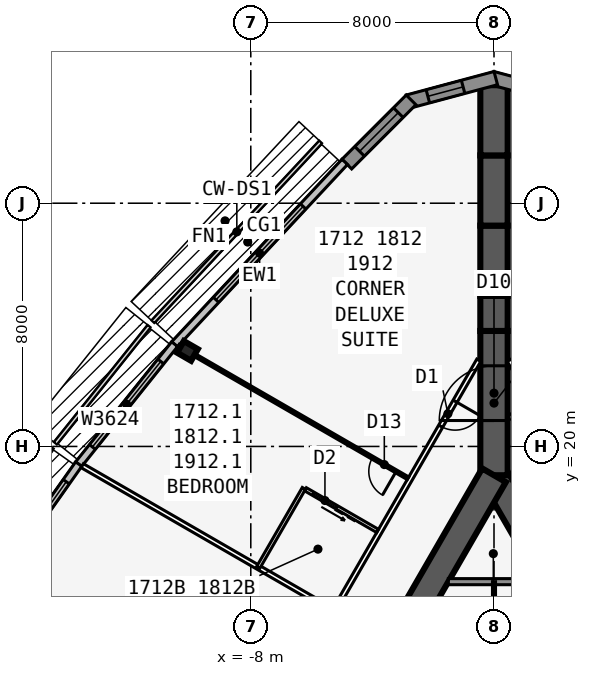
"""IFC4 building model, lengths in metres.
Left out: names, types, materials, properties, quantities, classifications, styles, units other than length and angle.
Written with IfcOpenShell. Run it as: python <this file> out.ifc"""

import sys

from ifc_helpers import new_model, si_unit, direction, frame, frame_2d, origin, origin_2d, place, context, subcontext, project, spatial, polyline, rectangle, i_section, outline, extrude, element, fill, save


model = new_model("IFC4")
c1 = context("Model", 3, precision=1e-05, world=origin(), true_north=direction((0.0, 1.0)))
c2 = subcontext(c1, "Body", "Model", "MODEL_VIEW")
j1 = project(units=[si_unit("LENGTHUNIT", "METRE"), si_unit("PLANEANGLEUNIT", "RADIAN")], contexts=[c1])
p1 = place(None, origin())
s1 = spatial("IfcSite", under=j1, at=p1, CompositionType="ELEMENT")
p2 = place(p1, origin())
s2 = spatial("IfcBuilding", under=s1, at=p2, CompositionType="ELEMENT")
p3 = place(p2, frame((0.0, 0.0, 69.3)))
s3 = spatial("IfcBuildingStorey", under=s2, at=p3, CompositionType="ELEMENT", Elevation=69.3)
p4 = place(p3, frame((16.5, -9.526, 0.0), z_axis=(0.0, 0.0, 1.0), x_axis=(-0.499999749417, 0.866025548458, 0.0)))
e1 = element("IfcWall", 1, at=p4, inside=s3, PredefinedType="SHEAR", context=c2, shape_type="SweptSolid", body=[
    extrude(rectangle(XDim=33.0, YDim=0.9, at=frame_2d((16.5, 0.0))), origin(), (0.0, 0.0, 1.0), 3.4),
])
p5 = place(p4, frame((14.15, 0.0, 0.0)))
e2 = element("IfcOpeningElement", 2, at=p5, cuts=e1, PredefinedType="OPENING", context=c2, shape_type="SweptSolid", body=[
    extrude(rectangle(XDim=1.8, YDim=2.13, at=frame_2d((0.9, 1.065))), frame((0.0, 0.46, 0.0), z_axis=(0.0, -1.0, 0.0), x_axis=(1.0, 0.0, 0.0)), (0.0, 0.0, 1.0), 0.92),
])
p6 = place(p4, frame((12.6, 0.0, 0.0)))
e3 = element("IfcOpeningElement", 3, at=p6, cuts=e1, PredefinedType="OPENING", context=c2, shape_type="SweptSolid", body=[
    extrude(rectangle(XDim=1.0, YDim=2.13, at=frame_2d((0.5, 1.065))), frame((0.0, 0.46, 0.0), z_axis=(0.0, -1.0, 0.0), x_axis=(1.0, 0.0, 0.0)), (0.0, 0.0, 1.0), 0.92),
])
p7 = place(p3, frame((0.0, 19.052, 0.0), z_axis=(0.0, 0.0, 1.0), x_axis=(-0.499999749417, -0.866025548458, 0.0)))
e4 = element("IfcWall", 4, at=p7, inside=s3, PredefinedType="SHEAR", context=c2, shape_type="SweptSolid", body=[
    extrude(rectangle(XDim=33.0, YDim=0.9, at=frame_2d((16.5, 0.0))), origin(), (0.0, 0.0, 1.0), 3.4),
])
p8 = place(p7, frame((14.15, 0.0, 0.0)))
e5 = element("IfcOpeningElement", 5, at=p8, cuts=e4, PredefinedType="OPENING", context=c2, shape_type="SweptSolid", body=[
    extrude(rectangle(XDim=1.8, YDim=2.13, at=frame_2d((0.9, 1.065))), frame((0.0, 0.46, 0.0), z_axis=(0.0, -1.0, 0.0), x_axis=(1.0, 0.0, 0.0)), (0.0, 0.0, 1.0), 0.92),
])
p9 = place(p7, frame((12.6, 0.0, 0.0)))
e6 = element("IfcOpeningElement", 6, at=p9, cuts=e4, PredefinedType="OPENING", context=c2, shape_type="SweptSolid", body=[
    extrude(rectangle(XDim=1.0, YDim=2.13, at=frame_2d((0.5, 1.065))), frame((0.0, 0.46, 0.0), z_axis=(0.0, -1.0, 0.0), x_axis=(1.0, 0.0, 0.0)), (0.0, 0.0, 1.0), 0.92),
])
p10 = place(p3, frame((0.0, 19.052, 0.0), z_axis=(0.0, 0.0, 1.0), x_axis=(0.0, 1.0, 0.0)))
e7 = element("IfcWall", 7, at=p10, inside=s3, PredefinedType="SHEAR", context=c2, shape_type="SweptSolid", body=[
    extrude(rectangle(XDim=4.746, YDim=0.9, at=frame_2d((2.373, 0.0))), origin(), (0.0, 0.0, 1.0), 3.4),
])
p11 = place(p10, frame((1.8, 0.0, 0.0)))
e8 = element("IfcOpeningElement", 8, at=p11, cuts=e7, PredefinedType="OPENING", context=c2, shape_type="SweptSolid", body=[
    extrude(rectangle(XDim=1.8, YDim=2.13, at=frame_2d((0.9, 1.065))), frame((0.0, 0.46, 0.0), z_axis=(0.0, -1.0, 0.0), x_axis=(1.0, 0.0, 0.0)), (0.0, 0.0, 1.0), 0.92),
])
p12 = place(p3, frame((0.0, 23.799, 0.0), z_axis=(0.0, 0.0, 1.0), x_axis=(0.0, 1.0, 0.0)))
e9 = element("IfcWall", 9, at=p12, inside=s3, PredefinedType="SHEAR", context=c2, shape_type="SweptSolid", body=[
    extrude(rectangle(XDim=1.155, YDim=0.9, at=frame_2d((0.577, 0.0))), origin(), (0.0, 0.0, 1.0), 3.4),
])
p13 = place(p3, frame((0.0, 24.953, 0.0), z_axis=(0.0, 0.0, 1.0), x_axis=(0.0, 1.0, 0.0)))
e10 = element("IfcWall", 10, at=p13, inside=s3, PredefinedType="SHEAR", context=c2, shape_type="SweptSolid", body=[
    extrude(rectangle(XDim=2.309, YDim=0.9, at=frame_2d((1.155, 0.0))), origin(), (0.0, 0.0, 1.0), 3.4),
])
p14 = place(p3, frame((0.0, 27.263, 0.0), z_axis=(0.0, 0.0, 1.0), x_axis=(0.0, 1.0, 0.0)))
e11 = element("IfcWall", 11, at=p14, inside=s3, PredefinedType="SHEAR", context=c2, shape_type="SweptSolid", body=[
    extrude(rectangle(XDim=2.31, YDim=0.9, at=frame_2d((1.155, 0.0))), origin(), (0.0, 0.0, 1.0), 3.4),
])
p15 = place(p3, frame((0.0, 29.572, 0.0), z_axis=(0.0, 0.0, 1.0), x_axis=(0.0, 1.0, 0.0)))
e12 = element("IfcWall", 12, at=p15, inside=s3, PredefinedType="SHEAR", context=c2, shape_type="SweptSolid", body=[
    extrude(rectangle(XDim=2.309, YDim=0.9, at=frame_2d((1.155, 0.0))), origin(), (0.0, 0.0, 1.0), 3.4),
])
p16 = place(p3, frame((-10.083, 23.142, 0.0), z_axis=(0.0, 0.0, 1.0), x_axis=(-0.5, -0.866025403784, 0.0)))
e13 = element("IfcColumn", 13, at=p16, inside=s3, PredefinedType="COLUMN", context=c2, shape_type="SweptSolid", body=[
    extrude(i_section(OverallWidth=0.442, OverallDepth=0.531, WebThickness=0.066, FlangeThickness=0.106, at=origin_2d()), origin(), (0.0, 0.0, 1.0), 3.4),
])
p17 = place(p3, frame((2.829, 31.341, 0.0), z_axis=(0.0, 0.0, 1.0), x_axis=(-0.965930548995, 0.258801419081, 0.0)))
e14 = element("IfcWall", 14, at=p17, inside=s3, PredefinedType="SOLIDWALL", context=c2, shape_type="SweptSolid", body=[
    extrude(outline(polyline([(2.989, 0.225), (2.929, 0.225), (2.438, 0.093), (2.402, 0.225), (0.0, 0.225), (0.0, -0.225), (2.989, -0.225), (2.989, 0.225)])), origin(), (0.0, 0.0, 1.0), 3.235),
])
p18 = place(p17, frame((0.676, 0.0, 0.45)))
e15 = element("IfcOpeningElement", 15, at=p18, cuts=e14, PredefinedType="OPENING", context=c2, shape_type="SweptSolid", body=[
    extrude(rectangle(XDim=1.2, YDim=2.4, at=frame_2d((0.6, 1.2))), frame((0.0, 0.235, 0.0), z_axis=(0.0, -1.0, 0.0), x_axis=(1.0, 0.0, 0.0)), (0.0, 0.0, 1.0), 0.47),
])
p19 = place(p3, frame((0.058, 32.114, 0.0), z_axis=(0.0, 0.0, 1.0), x_axis=(-0.965930548995, -0.258801419081, 0.0)))
e16 = element("IfcWall", 16, at=p19, inside=s3, PredefinedType="SOLIDWALL", context=c2, shape_type="SweptSolid", body=[
    extrude(outline(polyline([(2.989, 0.225), (0.586, 0.225), (0.551, 0.093), (0.059, 0.225), (0.0, 0.225), (0.0, -0.225), (2.989, -0.225), (2.989, 0.225)])), origin(), (0.0, 0.0, 1.0), 3.235),
])
p20 = place(p19, frame((1.113, 0.0, 0.45)))
e17 = element("IfcOpeningElement", 17, at=p20, cuts=e16, PredefinedType="OPENING", context=c2, shape_type="SweptSolid", body=[
    extrude(rectangle(XDim=1.2, YDim=2.4, at=frame_2d((0.6, 1.2))), frame((0.0, 0.235, 0.0), z_axis=(0.0, -1.0, 0.0), x_axis=(1.0, 0.0, 0.0)), (0.0, 0.0, 1.0), 0.47),
])
p21 = place(p3, frame((-2.728, 31.399, 0.0), z_axis=(0.0, 0.0, 1.0), x_axis=(-0.707106781187, -0.707106781187, 0.0)))
e18 = element("IfcWall", 18, at=p21, inside=s3, PredefinedType="SOLIDWALL", context=c2, shape_type="SweptSolid", body=[
    extrude(rectangle(XDim=2.988, YDim=0.45, at=frame_2d((1.494, 0.0))), origin(), (0.0, 0.0, 1.0), 3.235),
])
p22 = place(p21, frame((0.594, 0.0, 0.45)))
e19 = element("IfcOpeningElement", 19, at=p22, cuts=e18, PredefinedType="OPENING", context=c2, shape_type="SweptSolid", body=[
    extrude(rectangle(XDim=1.8, YDim=2.4, at=frame_2d((0.9, 1.2))), frame((0.0, 0.235, 0.0), z_axis=(0.0, -1.0, 0.0), x_axis=(1.0, 0.0, 0.0)), (0.0, 0.0, 1.0), 0.47),
])
p23 = place(p3, frame((-4.909, 29.36, 0.0), z_axis=(0.0, 0.0, 1.0), x_axis=(-0.682289646561, -0.731081964075, 0.0)))
e20 = element("IfcWall", 20, at=p23, inside=s3, PredefinedType="STANDARD", context=c2, shape_type="SweptSolid", body=[
    extrude(rectangle(XDim=8.211, YDim=0.25, at=frame_2d((4.105, 0.0))), origin(), (0.0, 0.0, 1.0), 3.235),
])
p24 = place(p23, frame((2.006, 0.0, 0.45)))
e21 = element("IfcOpeningElement", 21, at=p24, cuts=e20, PredefinedType="OPENING", context=c2, shape_type="SweptSolid", body=[
    extrude(rectangle(XDim=4.2, YDim=2.4, at=frame_2d((2.1, 1.2))), frame((0.0, 0.135, 0.0), z_axis=(0.0, -1.0, 0.0), x_axis=(1.0, 0.0, 0.0)), (0.0, 0.0, 1.0), 0.27),
])
p25 = place(p3, frame((-10.505, 23.364, 0.0), z_axis=(0.0, 0.0, 1.0), x_axis=(-0.624594965756, -0.780948864364, 0.0)))
e22 = element("IfcWall", 22, at=p25, inside=s3, PredefinedType="STANDARD", context=c2, shape_type="SweptSolid", body=[
    extrude(rectangle(XDim=5.058, YDim=0.25, at=frame_2d((2.529, 0.0))), origin(), (0.0, 0.0, 1.0), 3.235),
])
p26 = place(p25, frame((0.729, 0.0, 0.45)))
e23 = element("IfcOpeningElement", 23, at=p26, cuts=e22, PredefinedType="OPENING", context=c2, shape_type="SweptSolid", body=[
    extrude(rectangle(XDim=3.6, YDim=2.4, at=frame_2d((1.8, 1.2))), frame((0.0, 0.135, 0.0), z_axis=(0.0, -1.0, 0.0), x_axis=(1.0, 0.0, 0.0)), (0.0, 0.0, 1.0), 0.27),
])
p27 = place(p3, frame((-13.659, 19.42, 0.0), z_axis=(0.0, 0.0, 1.0), x_axis=(-0.5766431066, -0.81699616132, 0.0)))
e24 = element("IfcWall", 24, at=p27, inside=s3, PredefinedType="STANDARD", context=c2, shape_type="SweptSolid", body=[
    extrude(rectangle(XDim=5.021, YDim=0.25, at=frame_2d((2.51, 0.0))), origin(), (0.0, 0.0, 1.0), 3.235),
])
p28 = place(p27, frame((0.71, 0.0, 0.45)))
e25 = element("IfcOpeningElement", 25, at=p28, cuts=e24, PredefinedType="OPENING", context=c2, shape_type="SweptSolid", body=[
    extrude(rectangle(XDim=3.6, YDim=2.4, at=frame_2d((1.8, 1.2))), frame((0.0, 0.135, 0.0), z_axis=(0.0, -1.0, 0.0), x_axis=(1.0, 0.0, 0.0)), (0.0, 0.0, 1.0), 0.27),
])
p29 = place(p3, frame((20.027, -10.985, 0.0), z_axis=(0.0, 0.0, 1.0), x_axis=(-0.500001677587, 0.866024435227, 0.0)))
e26 = element("IfcWall", 26, at=p29, inside=s3, PredefinedType="PARTITIONING", context=c2, shape_type="SweptSolid", body=[
    extrude(rectangle(XDim=39.054, YDim=0.15, at=frame_2d((19.527, 0.0))), origin(), (0.0, 0.0, 1.0), 3.235),
])
p30 = place(p29, frame((0.352, 0.0, 0.0)))
e27 = element("IfcOpeningElement", 27, at=p30, cuts=e26, PredefinedType="OPENING", context=c2, shape_type="SweptSolid", body=[
    extrude(rectangle(XDim=0.95, YDim=2.13, at=frame_2d((0.475, 1.065))), frame((0.0, 0.085, 0.0), z_axis=(0.0, -1.0, 0.0), x_axis=(1.0, 0.0, 0.0)), (0.0, 0.0, 1.0), 0.17),
])
p31 = place(p29, frame((6.552, 0.0, 0.0)))
e28 = element("IfcOpeningElement", 28, at=p31, cuts=e26, PredefinedType="OPENING", context=c2, shape_type="SweptSolid", body=[
    extrude(rectangle(XDim=0.95, YDim=2.13, at=frame_2d((0.475, 1.065))), frame((0.0, 0.085, 0.0), z_axis=(0.0, -1.0, 0.0), x_axis=(1.0, 0.0, 0.0)), (0.0, 0.0, 1.0), 0.17),
])
p32 = place(p29, frame((16.552, 0.0, 0.0)))
e29 = element("IfcOpeningElement", 29, at=p32, cuts=e26, PredefinedType="OPENING", context=c2, shape_type="SweptSolid", body=[
    extrude(rectangle(XDim=0.95, YDim=2.13, at=frame_2d((0.475, 1.065))), frame((0.0, 0.085, 0.0), z_axis=(0.0, -1.0, 0.0), x_axis=(1.0, 0.0, 0.0)), (0.0, 0.0, 1.0), 0.17),
])
p33 = place(p29, frame((25.952, 0.0, 0.0)))
e30 = element("IfcOpeningElement", 30, at=p33, cuts=e26, PredefinedType="OPENING", context=c2, shape_type="SweptSolid", body=[
    extrude(rectangle(XDim=0.95, YDim=2.13, at=frame_2d((0.475, 1.065))), frame((0.0, 0.085, 0.0), z_axis=(0.0, -1.0, 0.0), x_axis=(1.0, 0.0, 0.0)), (0.0, 0.0, 1.0), 0.17),
])
p34 = place(p29, frame((36.546, 0.0, 0.0)))
e31 = element("IfcOpeningElement", 31, at=p34, cuts=e26, PredefinedType="OPENING", context=c2, shape_type="SweptSolid", body=[
    extrude(rectangle(XDim=0.95, YDim=2.13, at=frame_2d((0.475, 1.065))), frame((0.0, 0.085, 0.0), z_axis=(0.0, -1.0, 0.0), x_axis=(1.0, 0.0, 0.0)), (0.0, 0.0, 1.0), 0.17),
])
p35 = place(p3, frame((-0.5, 22.836, 0.0), z_axis=(0.0, 0.0, 1.0), x_axis=(-0.500001677587, -0.866024435227, 0.0)))
e32 = element("IfcWall", 32, at=p35, inside=s3, PredefinedType="PARTITIONING", context=c2, shape_type="SweptSolid", body=[
    extrude(rectangle(XDim=39.054, YDim=0.15, at=frame_2d((19.527, 0.0))), origin(), (0.0, 0.0, 1.0), 3.235),
])
p36 = place(p35, frame((1.558, 0.0, 0.0)))
e33 = element("IfcOpeningElement", 33, at=p36, cuts=e32, PredefinedType="OPENING", context=c2, shape_type="SweptSolid", body=[
    extrude(rectangle(XDim=0.95, YDim=2.13, at=frame_2d((0.475, 1.065))), frame((0.0, 0.085, 0.0), z_axis=(0.0, -1.0, 0.0), x_axis=(1.0, 0.0, 0.0)), (0.0, 0.0, 1.0), 0.17),
])
p37 = place(p35, frame((11.552, 0.0, 0.0)))
e34 = element("IfcOpeningElement", 34, at=p37, cuts=e32, PredefinedType="OPENING", context=c2, shape_type="SweptSolid", body=[
    extrude(rectangle(XDim=0.95, YDim=2.13, at=frame_2d((0.475, 1.065))), frame((0.0, 0.085, 0.0), z_axis=(0.0, -1.0, 0.0), x_axis=(1.0, 0.0, 0.0)), (0.0, 0.0, 1.0), 0.17),
])
p38 = place(p35, frame((20.952, 0.0, 0.0)))
e35 = element("IfcOpeningElement", 35, at=p38, cuts=e32, PredefinedType="OPENING", context=c2, shape_type="SweptSolid", body=[
    extrude(rectangle(XDim=0.95, YDim=2.13, at=frame_2d((0.475, 1.065))), frame((0.0, 0.085, 0.0), z_axis=(0.0, -1.0, 0.0), x_axis=(1.0, 0.0, 0.0)), (0.0, 0.0, 1.0), 0.17),
])
p39 = place(p35, frame((27.752, 0.0, 0.0)))
e36 = element("IfcOpeningElement", 36, at=p39, cuts=e32, PredefinedType="OPENING", context=c2, shape_type="SweptSolid", body=[
    extrude(rectangle(XDim=0.95, YDim=2.13, at=frame_2d((0.475, 1.065))), frame((0.0, 0.085, 0.0), z_axis=(0.0, -1.0, 0.0), x_axis=(1.0, 0.0, 0.0)), (0.0, 0.0, 1.0), 0.17),
])
p40 = place(p35, frame((36.546, 0.0, 0.0)))
e37 = element("IfcOpeningElement", 37, at=p40, cuts=e32, PredefinedType="OPENING", context=c2, shape_type="SweptSolid", body=[
    extrude(rectangle(XDim=0.95, YDim=2.13, at=frame_2d((0.475, 1.065))), frame((0.0, 0.085, 0.0), z_axis=(0.0, -1.0, 0.0), x_axis=(1.0, 0.0, 0.0)), (0.0, 0.0, 1.0), 0.17),
])
p41 = place(p3, frame((-2.829, 18.954, 0.0), z_axis=(0.0, 0.0, 1.0), x_axis=(-0.866020536561, 0.500008430184, 0.0)))
e38 = element("IfcWall", 38, at=p41, inside=s3, PredefinedType="PARTITIONING", context=c2, shape_type="SweptSolid", body=[
    extrude(rectangle(XDim=8.72, YDim=0.1, at=frame_2d((4.36, 0.0))), origin(), (0.0, 0.0, 1.0), 2.389),
])
p42 = place(p41, frame((0.45, 0.0, 0.0)))
e39 = element("IfcOpeningElement", 39, at=p42, cuts=e38, PredefinedType="OPENING", context=c2, shape_type="SweptSolid", body=[
    extrude(rectangle(XDim=0.9, YDim=2.13, at=frame_2d((0.45, 1.065))), frame((0.0, 0.06, 0.0), z_axis=(0.0, -1.0, 0.0), x_axis=(1.0, 0.0, 0.0)), (0.0, 0.0, 1.0), 0.12),
])
p43 = place(p3, frame((-5.329, 14.623, 0.0), z_axis=(0.0, 0.0, 1.0), x_axis=(-0.866018409083, 0.500012114982, 0.0)))
e40 = element("IfcWall", 40, at=p43, inside=s3, PredefinedType="PARTITIONING", context=c2, shape_type="SweptSolid", body=[
    extrude(rectangle(XDim=9.485, YDim=0.15, at=frame_2d((4.742, 0.0))), origin(), (0.0, 0.0, 1.0), 2.389),
])
p44 = place(p3, frame((-7.829, 10.293, 0.0), z_axis=(0.0, 0.0, 1.0), x_axis=(-0.866016302457, 0.50001576363, 0.0)))
e41 = element("IfcWall", 41, at=p44, inside=s3, PredefinedType="PARTITIONING", context=c2, shape_type="SweptSolid", body=[
    extrude(rectangle(XDim=9.943, YDim=0.1, at=frame_2d((4.972, 0.0))), origin(), (0.0, 0.0, 1.0), 2.389),
])
p45 = place(p44, frame((0.45, 0.0, 0.0)))
e42 = element("IfcOpeningElement", 42, at=p45, cuts=e41, PredefinedType="OPENING", context=c2, shape_type="SweptSolid", body=[
    extrude(rectangle(XDim=0.9, YDim=2.13, at=frame_2d((0.45, 1.065))), frame((0.0, 0.06, 0.0), z_axis=(0.0, -1.0, 0.0), x_axis=(1.0, 0.0, 0.0)), (0.0, 0.0, 1.0), 0.12),
])
p46 = place(p3, frame((-6.253, 18.622, 0.0), z_axis=(0.0, 0.0, 1.0), x_axis=(-0.499990139034, -0.866031096941, 0.0)))
e43 = element("IfcWall", 43, at=p46, inside=s3, PredefinedType="PLUMBINGWALL", context=c2, shape_type="SweptSolid", body=[
    extrude(rectangle(XDim=3.0, YDim=0.12, at=frame_2d((1.5, 0.0))), origin(), (0.0, 0.0, 1.0), 3.235),
])
p47 = place(p3, frame((-3.829, 17.221, 0.0), z_axis=(0.0, 0.0, 1.0), x_axis=(-0.865997131366, 0.500048966069, 0.0)))
e44 = element("IfcWall", 44, at=p47, inside=s3, PredefinedType="PLUMBINGWALL", context=c2, shape_type="SweptSolid", body=[
    extrude(rectangle(XDim=2.74, YDim=0.12, at=frame_2d((1.37, 0.0))), origin(), (0.0, 0.0, 1.0), 3.235),
])
p48 = place(p47, frame((1.55, 0.0, 0.0)))
e45 = element("IfcOpeningElement", 45, at=p48, cuts=e44, PredefinedType="OPENING", context=c2, shape_type="SweptSolid", body=[
    extrude(rectangle(XDim=0.9, YDim=2.13, at=frame_2d((0.45, 1.065))), frame((0.0, 0.07, 0.0), z_axis=(0.0, -1.0, 0.0), x_axis=(1.0, 0.0, 0.0)), (0.0, 0.0, 1.0), 0.14),
])
p49 = place(p3, frame((-1.501, 15.552, 0.0), z_axis=(0.0, 0.0, 1.0), x_axis=(1.0, 0.0, 0.0)))
e46 = element("IfcWall", 46, at=p49, inside=s3, PredefinedType="SOLIDWALL", context=c2, shape_type="SweptSolid", body=[
    extrude(rectangle(XDim=3.002, YDim=0.2, at=frame_2d((1.501, 0.0))), origin(), (0.0, 0.0, 1.0), 3.235),
])
p50 = place(p3, frame((0.0, 15.552, 0.0), z_axis=(0.0, 0.0, 1.0), x_axis=(0.0, -1.0, 0.0)))
e47 = element("IfcWall", 47, at=p50, inside=s3, PredefinedType="PARTITIONING", context=c2, shape_type="SweptSolid", body=[
    extrude(rectangle(XDim=3.775, YDim=0.1, at=frame_2d((1.888, 0.0))), origin(), (0.0, 0.0, 1.0), 3.235),
])
p51 = place(p50, frame((1.815, 0.0, 0.0)))
e48 = element("IfcOpeningElement", 48, at=p51, cuts=e47, PredefinedType="OPENING", context=c2, shape_type="SweptSolid", body=[
    extrude(rectangle(XDim=0.9, YDim=2.13, at=frame_2d((0.45, 1.065))), frame((0.0, 0.06, 0.0), z_axis=(0.0, -1.0, 0.0), x_axis=(1.0, 0.0, 0.0)), (0.0, 0.0, 1.0), 0.12),
])
p52 = place(p20, origin())
e49 = element("IfcWindow", 49, at=p52, inside=s3, PartitioningType="SINGLE_PANEL", PredefinedType="WINDOW", context=c2, shape_type="SweptSolid", body=[
    extrude(rectangle(XDim=1.2, YDim=2.4, at=frame_2d((0.6, 1.2))), frame((0.0, 0.03, 0.0), z_axis=(0.0, -1.0, 0.0), x_axis=(1.0, 0.0, 0.0)), (0.0, 0.0, 1.0), 0.06),
])
fill(e17, e49)
p53 = place(p22, origin())
e50 = element("IfcWindow", 50, at=p53, inside=s3, PartitioningType="SINGLE_PANEL", PredefinedType="WINDOW", context=c2, shape_type="SweptSolid", body=[
    extrude(rectangle(XDim=1.8, YDim=2.4, at=frame_2d((0.9, 1.2))), frame((0.0, 0.03, 0.0), z_axis=(0.0, -1.0, 0.0), x_axis=(1.0, 0.0, 0.0)), (0.0, 0.0, 1.0), 0.06),
])
fill(e19, e50)
p54 = place(p24, origin())
e51 = element("IfcWindow", 51, at=p54, inside=s3, PartitioningType="SINGLE_PANEL", PredefinedType="WINDOW", context=c2, shape_type="SweptSolid", body=[
    extrude(rectangle(XDim=4.2, YDim=2.4, at=frame_2d((2.1, 1.2))), frame((0.0, 0.03, 0.0), z_axis=(0.0, -1.0, 0.0), x_axis=(1.0, 0.0, 0.0)), (0.0, 0.0, 1.0), 0.06),
])
fill(e21, e51)
p55 = place(p26, origin())
e52 = element("IfcWindow", 52, at=p55, inside=s3, PartitioningType="SINGLE_PANEL", PredefinedType="WINDOW", context=c2, shape_type="SweptSolid", body=[
    extrude(rectangle(XDim=3.6, YDim=2.4, at=frame_2d((1.8, 1.2))), frame((0.0, 0.03, 0.0), z_axis=(0.0, -1.0, 0.0), x_axis=(1.0, 0.0, 0.0)), (0.0, 0.0, 1.0), 0.06),
])
fill(e23, e52)
p56 = place(p28, origin())
e53 = element("IfcWindow", 53, at=p56, inside=s3, PartitioningType="SINGLE_PANEL", PredefinedType="WINDOW", context=c2, shape_type="SweptSolid", body=[
    extrude(rectangle(XDim=3.6, YDim=2.4, at=frame_2d((1.8, 1.2))), frame((0.0, 0.03, 0.0), z_axis=(0.0, -1.0, 0.0), x_axis=(1.0, 0.0, 0.0)), (0.0, 0.0, 1.0), 0.06),
])
fill(e25, e53)
p57 = place(p42, origin())
e54 = element("IfcDoor", 54, at=p57, inside=s3, OperationType="SINGLE_SWING_LEFT", PredefinedType="DOOR", context=c2, shape_type="SweptSolid", body=[
    extrude(rectangle(XDim=0.9, YDim=2.13, at=frame_2d((0.45, 1.065))), frame((0.0, 0.025, 0.0), z_axis=(0.0, -1.0, 0.0), x_axis=(1.0, 0.0, 0.0)), (0.0, 0.0, 1.0), 0.05),
])
fill(e39, e54)
p58 = place(p36, origin())
e55 = element("IfcDoor", 55, at=p58, inside=s3, OperationType="SINGLE_SWING_LEFT", PredefinedType="DOOR", context=c2, shape_type="SweptSolid", body=[
    extrude(rectangle(XDim=0.95, YDim=2.13, at=frame_2d((0.475, 1.065))), frame((0.0, 0.025, 0.0), z_axis=(0.0, -1.0, 0.0), x_axis=(1.0, 0.0, 0.0)), (0.0, 0.0, 1.0), 0.05),
])
fill(e33, e55)
p59 = place(p48, origin())
e56 = element("IfcDoor", 56, at=p59, inside=s3, OperationType="SLIDING_TO_LEFT", PredefinedType="DOOR", context=c2, shape_type="SweptSolid", body=[
    extrude(rectangle(XDim=0.9, YDim=2.13, at=frame_2d((0.45, 1.065))), frame((0.0, 0.025, 0.0), z_axis=(0.0, -1.0, 0.0), x_axis=(1.0, 0.0, 0.0)), (0.0, 0.0, 1.0), 0.05),
])
fill(e45, e56)
p60 = place(p11, origin())
e57 = element("IfcDoor", 57, at=p60, inside=s3, OperationType="DOUBLE_DOOR_DOUBLE_SWING", PredefinedType="DOOR", context=c2, shape_type="SweptSolid", body=[
    extrude(rectangle(XDim=1.8, YDim=2.13, at=frame_2d((0.9, 1.065))), frame((0.0, 0.025, 0.0), z_axis=(0.0, -1.0, 0.0), x_axis=(1.0, 0.0, 0.0)), (0.0, 0.0, 1.0), 0.05),
])
fill(e8, e57)
save(model, sys.argv[1])
